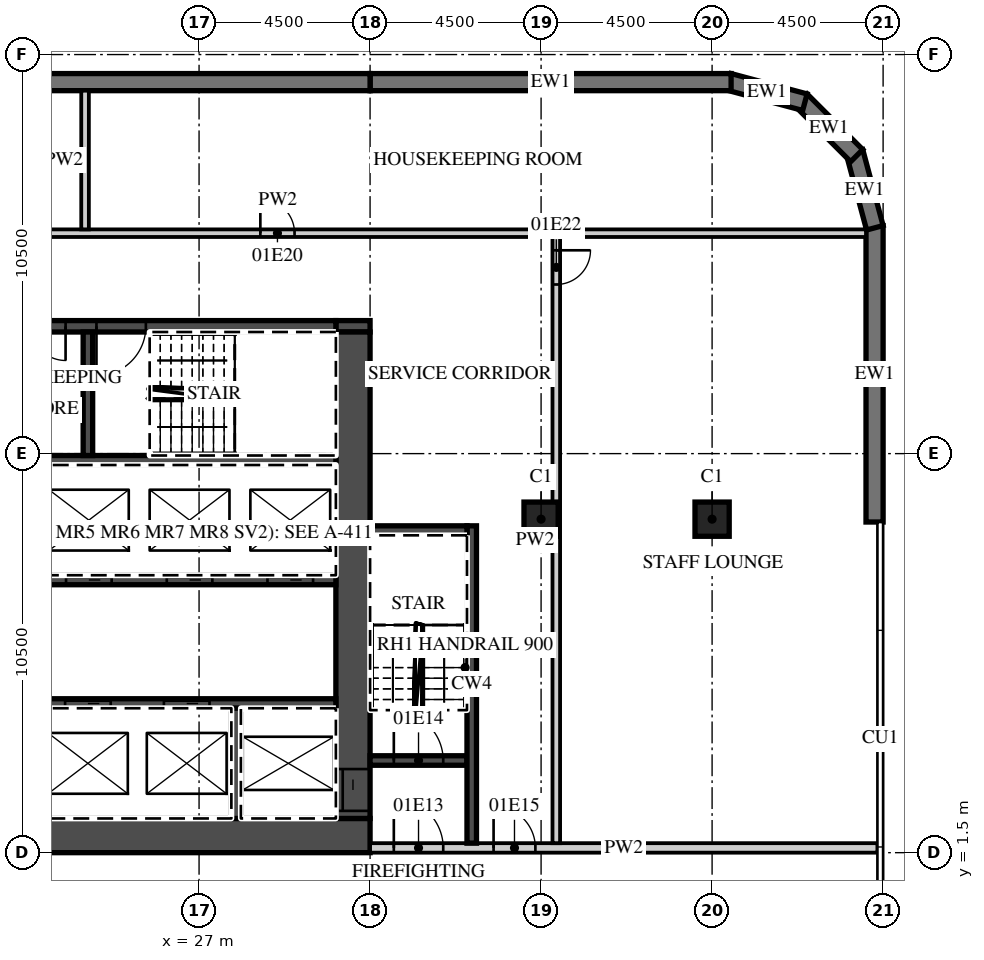
"""IFC4 building model, lengths in metres.
Left out: names, types, materials, properties, quantities, classifications, styles, units other than length and angle.
Written with IfcOpenShell. Run it as: python <this file> out.ifc"""

import sys

from ifc_helpers import new_model, si_unit, direction, frame, frame_2d, origin, origin_2d, place, context, subcontext, project, spatial, polyline, rectangle, outline, extrude, element, fill, save


model = new_model("IFC4")
c1 = context("Model", 3, precision=1e-05, world=origin(), true_north=direction((0.0, 1.0)))
c2 = subcontext(c1, "Body", "Model", "MODEL_VIEW")
j1 = project(units=[si_unit("LENGTHUNIT", "METRE"), si_unit("PLANEANGLEUNIT", "RADIAN")], contexts=[c1])
p1 = place(None, origin())
s1 = spatial("IfcSite", under=j1, at=p1, CompositionType="ELEMENT")
p2 = place(p1, origin())
s2 = spatial("IfcBuilding", under=s1, at=p2, CompositionType="ELEMENT")
p3 = place(p2, frame((0.0, 0.0, 11.0)))
s3 = spatial("IfcBuildingStorey", under=s2, at=p3, CompositionType="ELEMENT", Elevation=11.0)
for number, where, z_axis, x_axis in (
    (1, (36.0, 10.275, 0.0), (0.0, 0.0, 1.0), (1.0, 0.0, 0.0)),
    (2, (40.5, 10.275, 0.0), (0.0, 0.0, 1.0), (1.0, 0.0, 0.0)),
):
    element("IfcColumn", number, at=place(p3, frame(where, z_axis=z_axis, x_axis=x_axis)), inside=s3, PredefinedType="COLUMN", context=c2, shape_type="SweptSolid", body=[
        extrude(rectangle(XDim=0.9, YDim=0.9, at=origin_2d()), origin(), (0.0, 0.0, 1.0), 6.0),
    ])
p4 = place(p3, frame((44.775, 10.2, 0.0), z_axis=(0.0, 0.0, 1.0), x_axis=(0.0, 1.0, 0.0)))
e3 = element("IfcWall", 3, at=p4, inside=s3, PredefinedType="SOLIDWALL", context=c2, shape_type="SweptSolid", body=[
    extrude(rectangle(XDim=7.8, YDim=0.45, at=frame_2d((3.9, 0.0))), origin(), (0.0, 0.0, 1.0), 5.55),
])
p5 = place(p3, frame((44.783, 17.942, 0.0), z_axis=(0.0, 0.0, 1.0), x_axis=(-0.25881466832, 0.965926999034, 0.0)))
e4 = element("IfcWall", 4, at=p5, inside=s3, PredefinedType="SOLIDWALL", context=c2, shape_type="SweptSolid", body=[
    extrude(outline(polyline([(0.0, -0.225), (2.071, -0.225), (1.95, 0.225), (0.121, 0.225), (0.0, -0.225)])), origin(), (0.0, 0.0, 1.0), 5.55),
])
p6 = place(p3, frame((44.305, 19.841, 0.0), z_axis=(0.0, 0.0, 1.0), x_axis=(-0.707106781187, 0.707106781187, 0.0)))
e5 = element("IfcWall", 5, at=p6, inside=s3, PredefinedType="SOLIDWALL", context=c2, shape_type="SweptSolid", body=[
    extrude(outline(polyline([(0.0, -0.225), (2.071, -0.225), (1.95, 0.225), (0.121, 0.225), (0.0, -0.225)])), origin(), (0.0, 0.0, 1.0), 5.55),
])
p7 = place(p3, frame((42.942, 21.247, 0.0), z_axis=(0.0, 0.0, 1.0), x_axis=(-0.965926999034, 0.25881466832, 0.0)))
e6 = element("IfcWall", 6, at=p7, inside=s3, PredefinedType="SOLIDWALL", context=c2, shape_type="SweptSolid", body=[
    extrude(outline(polyline([(-0.0, -0.225), (2.07, -0.225), (1.95, 0.225), (0.12, 0.225), (-0.0, -0.225)])), origin(), (0.0, 0.0, 1.0), 5.55),
])
p8 = place(p3, frame((41.0, 21.775, 0.0), z_axis=(0.0, 0.0, 1.0), x_axis=(-1.0, 0.0, 0.0)))
e7 = element("IfcWall", 7, at=p8, inside=s3, PredefinedType="SOLIDWALL", context=c2, shape_type="SweptSolid", body=[
    extrude(rectangle(XDim=9.5, YDim=0.45, at=frame_2d((4.75, 0.0))), origin(), (0.0, 0.0, 1.0), 5.55),
])
p9 = place(p3, frame((31.5, 21.775, 0.0), z_axis=(0.0, 0.0, 1.0), x_axis=(-1.0, 0.0, 0.0)))
e8 = element("IfcWall", 8, at=p9, inside=s3, PredefinedType="SOLIDWALL", context=c2, shape_type="SweptSolid", body=[
    extrude(rectangle(XDim=18.0, YDim=0.45, at=frame_2d((9.0, 0.0))), origin(), (0.0, 0.0, 1.0), 5.55),
])
p10 = place(p3, frame((13.5, 1.95, 0.0), z_axis=(0.0, 0.0, 1.0), x_axis=(1.0, 0.0, 0.0)))
e9 = element("IfcWall", 9, at=p10, inside=s3, PredefinedType="SHEAR", context=c2, shape_type="SweptSolid", body=[
    extrude(rectangle(XDim=18.0, YDim=0.9, at=frame_2d((9.0, 0.0))), origin(), (0.0, 0.0, 1.0), 5.55),
])
p11 = place(p10, frame((1.475, 0.0, 0.0)))
e10 = element("IfcOpeningElement", 10, at=p11, cuts=e9, PredefinedType="OPENING", context=c2, shape_type="SweptSolid", body=[
    extrude(rectangle(XDim=1.8, YDim=2.1, at=frame_2d((0.9, 1.05))), frame((0.0, 0.46, 0.0), z_axis=(0.0, -1.0, 0.0), x_axis=(1.0, 0.0, 0.0)), (0.0, 0.0, 1.0), 0.92),
])
p12 = place(p3, frame((30.6, 15.35, 0.0), z_axis=(0.0, 0.0, 1.0), x_axis=(1.0, 0.0, 0.0)))
e11 = element("IfcWall", 11, at=p12, inside=s3, PredefinedType="SHEAR", context=c2, shape_type="SweptSolid", body=[
    extrude(rectangle(XDim=0.9, YDim=0.3, at=frame_2d((0.45, 0.0))), origin(), (0.0, 0.0, 1.0), 5.55),
])
p13 = place(p3, frame((20.3, 15.35, 0.0), z_axis=(0.0, 0.0, 1.0), x_axis=(1.0, 0.0, 0.0)))
e12 = element("IfcWall", 12, at=p13, inside=s3, PredefinedType="SHEAR", context=c2, shape_type="SweptSolid", body=[
    extrude(rectangle(XDim=10.3, YDim=0.3, at=frame_2d((5.15, 0.0))), origin(), (0.0, 0.0, 1.0), 5.55),
])
p14 = place(p13, frame((4.0, 0.0, 0.0)))
e13 = element("IfcOpeningElement", 13, at=p14, cuts=e12, PredefinedType="OPENING", context=c2, shape_type="SweptSolid", body=[
    extrude(rectangle(XDim=1.3, YDim=2.1, at=frame_2d((0.65, 1.05))), frame((0.0, 0.16, 0.0), z_axis=(0.0, -1.0, 0.0), x_axis=(1.0, 0.0, 0.0)), (0.0, 0.0, 1.0), 0.32),
])
p15 = place(p13, frame((2.288, 0.0, 0.0)))
e14 = element("IfcOpeningElement", 14, at=p15, cuts=e12, PredefinedType="OPENING", context=c2, shape_type="SweptSolid", body=[
    extrude(rectangle(XDim=0.9, YDim=2.1, at=frame_2d((0.45, 1.05))), frame((0.0, 0.16, 0.0), z_axis=(0.0, -1.0, 0.0), x_axis=(1.0, 0.0, 0.0)), (0.0, 0.0, 1.0), 0.32),
])
p16 = place(p13, frame((0.462, 0.0, 0.0)))
e15 = element("IfcOpeningElement", 15, at=p16, cuts=e12, PredefinedType="OPENING", context=c2, shape_type="SweptSolid", body=[
    extrude(rectangle(XDim=0.9, YDim=2.1, at=frame_2d((0.45, 1.05))), frame((0.0, 0.16, 0.0), z_axis=(0.0, -1.0, 0.0), x_axis=(1.0, 0.0, 0.0)), (0.0, 0.0, 1.0), 0.32),
])
p17 = place(p3, frame((31.05, 2.4, 0.0), z_axis=(0.0, 0.0, 1.0), x_axis=(0.0, 1.0, 0.0)))
e16 = element("IfcWall", 16, at=p17, inside=s3, PredefinedType="SHEAR", context=c2, shape_type="SweptSolid", body=[
    extrude(rectangle(XDim=12.8, YDim=0.9, at=frame_2d((6.4, 0.0))), origin(), (0.0, 0.0, 1.0), 5.55),
])
p18 = place(p17, frame((0.2, 0.0, 0.0)))
e17 = element("IfcOpeningElement", 17, at=p18, cuts=e16, PredefinedType="OPENING", context=c2, shape_type="SweptSolid", body=[
    extrude(rectangle(XDim=1.1, YDim=2.1, at=frame_2d((0.55, 1.05))), frame((0.0, 0.46, 0.0), z_axis=(0.0, -1.0, 0.0), x_axis=(1.0, 0.0, 0.0)), (0.0, 0.0, 1.0), 0.92),
])
p19 = place(p3, frame((17.6, 5.425, 0.0), z_axis=(0.0, 0.0, 1.0), x_axis=(1.0, 0.0, 0.0)))
e18 = element("IfcWall", 18, at=p19, inside=s3, PredefinedType="SHEAR", context=c2, shape_type="SweptSolid", body=[
    extrude(rectangle(XDim=13.0, YDim=0.25, at=frame_2d((6.5, 0.0))), origin(), (0.0, 0.0, 1.0), 5.55),
])
p20 = place(p19, frame((8.475, 0.0, 0.0)))
e19 = element("IfcOpeningElement", 19, at=p20, cuts=e18, PredefinedType="OPENING", context=c2, shape_type="SweptSolid", body=[
    extrude(rectangle(XDim=1.2, YDim=2.1, at=frame_2d((0.6, 1.05))), frame((0.0, 0.135, 0.0), z_axis=(0.0, -1.0, 0.0), x_axis=(1.0, 0.0, 0.0)), (0.0, 0.0, 1.0), 0.27),
])
p21 = place(p19, frame((5.875, 0.0, 0.0)))
e20 = element("IfcOpeningElement", 20, at=p21, cuts=e18, PredefinedType="OPENING", context=c2, shape_type="SweptSolid", body=[
    extrude(rectangle(XDim=1.2, YDim=2.1, at=frame_2d((0.6, 1.05))), frame((0.0, 0.135, 0.0), z_axis=(0.0, -1.0, 0.0), x_axis=(1.0, 0.0, 0.0)), (0.0, 0.0, 1.0), 0.27),
])
p22 = place(p19, frame((3.275, 0.0, 0.0)))
e21 = element("IfcOpeningElement", 21, at=p22, cuts=e18, PredefinedType="OPENING", context=c2, shape_type="SweptSolid", body=[
    extrude(rectangle(XDim=1.2, YDim=2.1, at=frame_2d((0.6, 1.05))), frame((0.0, 0.135, 0.0), z_axis=(0.0, -1.0, 0.0), x_axis=(1.0, 0.0, 0.0)), (0.0, 0.0, 1.0), 0.27),
])
p23 = place(p19, frame((0.625, 0.0, 0.0)))
e22 = element("IfcOpeningElement", 22, at=p23, cuts=e18, PredefinedType="OPENING", context=c2, shape_type="SweptSolid", body=[
    extrude(rectangle(XDim=1.2, YDim=2.1, at=frame_2d((0.6, 1.05))), frame((0.0, 0.135, 0.0), z_axis=(0.0, -1.0, 0.0), x_axis=(1.0, 0.0, 0.0)), (0.0, 0.0, 1.0), 0.27),
])
p24 = place(p3, frame((27.975, 2.4, 0.0), z_axis=(0.0, 0.0, 1.0), x_axis=(0.0, 1.0, 0.0)))
e23 = element("IfcWall", 23, at=p24, inside=s3, PredefinedType="SHEAR", context=c2, shape_type="SweptSolid", body=[
    extrude(rectangle(XDim=2.9, YDim=0.25, at=frame_2d((1.45, 0.0))), origin(), (0.0, 0.0, 1.0), 5.55),
])
p25 = place(p3, frame((14.4, 8.675, 0.0), z_axis=(0.0, 0.0, 1.0), x_axis=(1.0, 0.0, 0.0)))
e24 = element("IfcWall", 24, at=p25, inside=s3, PredefinedType="SHEAR", context=c2, shape_type="SweptSolid", body=[
    extrude(rectangle(XDim=16.2, YDim=0.25, at=frame_2d((8.1, 0.0))), origin(), (0.0, 0.0, 1.0), 5.55),
])
p26 = place(p25, frame((14.4, 0.0, 0.0)))
e25 = element("IfcOpeningElement", 25, at=p26, cuts=e24, PredefinedType="OPENING", context=c2, shape_type="SweptSolid", body=[
    extrude(rectangle(XDim=1.2, YDim=2.1, at=frame_2d((0.6, 1.05))), frame((0.0, 0.135, 0.0), z_axis=(0.0, -1.0, 0.0), x_axis=(1.0, 0.0, 0.0)), (0.0, 0.0, 1.0), 0.27),
])
p27 = place(p25, frame((11.75, 0.0, 0.0)))
e26 = element("IfcOpeningElement", 26, at=p27, cuts=e24, PredefinedType="OPENING", context=c2, shape_type="SweptSolid", body=[
    extrude(rectangle(XDim=1.2, YDim=2.1, at=frame_2d((0.6, 1.05))), frame((0.0, 0.135, 0.0), z_axis=(0.0, -1.0, 0.0), x_axis=(1.0, 0.0, 0.0)), (0.0, 0.0, 1.0), 0.27),
])
p28 = place(p25, frame((9.1, 0.0, 0.0)))
e27 = element("IfcOpeningElement", 27, at=p28, cuts=e24, PredefinedType="OPENING", context=c2, shape_type="SweptSolid", body=[
    extrude(rectangle(XDim=1.2, YDim=2.1, at=frame_2d((0.6, 1.05))), frame((0.0, 0.135, 0.0), z_axis=(0.0, -1.0, 0.0), x_axis=(1.0, 0.0, 0.0)), (0.0, 0.0, 1.0), 0.27),
])
p29 = place(p25, frame((6.45, 0.0, 0.0)))
e28 = element("IfcOpeningElement", 28, at=p29, cuts=e24, PredefinedType="OPENING", context=c2, shape_type="SweptSolid", body=[
    extrude(rectangle(XDim=1.2, YDim=2.1, at=frame_2d((0.6, 1.05))), frame((0.0, 0.135, 0.0), z_axis=(0.0, -1.0, 0.0), x_axis=(1.0, 0.0, 0.0)), (0.0, 0.0, 1.0), 0.27),
])
p30 = place(p25, frame((3.8, 0.0, 0.0)))
e29 = element("IfcOpeningElement", 29, at=p30, cuts=e24, PredefinedType="OPENING", context=c2, shape_type="SweptSolid", body=[
    extrude(rectangle(XDim=1.2, YDim=2.1, at=frame_2d((0.6, 1.05))), frame((0.0, 0.135, 0.0), z_axis=(0.0, -1.0, 0.0), x_axis=(1.0, 0.0, 0.0)), (0.0, 0.0, 1.0), 0.27),
])
p31 = place(p25, frame((0.65, 0.0, 0.0)))
e30 = element("IfcOpeningElement", 30, at=p31, cuts=e24, PredefinedType="OPENING", context=c2, shape_type="SweptSolid", body=[
    extrude(rectangle(XDim=1.3, YDim=2.1, at=frame_2d((0.65, 1.05))), frame((0.0, 0.135, 0.0), z_axis=(0.0, -1.0, 0.0), x_axis=(1.0, 0.0, 0.0)), (0.0, 0.0, 1.0), 0.27),
])
p32 = place(p3, frame((17.35, 11.825, 0.0), z_axis=(0.0, 0.0, 1.0), x_axis=(1.0, 0.0, 0.0)))
e31 = element("IfcWall", 31, at=p32, inside=s3, PredefinedType="SHEAR", context=c2, shape_type="SweptSolid", body=[
    extrude(rectangle(XDim=13.25, YDim=0.25, at=frame_2d((6.625, 0.0))), origin(), (0.0, 0.0, 1.0), 5.55),
])
p33 = place(p3, frame((24.075, 11.95, 0.0), z_axis=(0.0, 0.0, 1.0), x_axis=(0.0, 1.0, 0.0)))
e32 = element("IfcWall", 32, at=p33, inside=s3, PredefinedType="SHEAR", context=c2, shape_type="SweptSolid", body=[
    extrude(rectangle(XDim=3.25, YDim=0.25, at=frame_2d((1.625, 0.0))), origin(), (0.0, 0.0, 1.0), 5.55),
])
p34 = place(p3, frame((31.5, 1.625, 0.0), z_axis=(0.0, 0.0, 1.0), x_axis=(1.0, 0.0, 0.0)))
e33 = element("IfcWall", 33, at=p34, inside=s3, PredefinedType="PARTITIONING", context=c2, shape_type="SweptSolid", body=[
    extrude(rectangle(XDim=13.35, YDim=0.25, at=frame_2d((6.675, 0.0))), origin(), (0.0, 0.0, 1.0), 5.55),
])
p35 = place(p34, frame((0.625, 0.0, 0.0)))
e34 = element("IfcOpeningElement", 34, at=p35, cuts=e33, PredefinedType="OPENING", context=c2, shape_type="SweptSolid", body=[
    extrude(rectangle(XDim=1.3, YDim=2.1, at=frame_2d((0.65, 1.05))), frame((0.0, 0.135, 0.0), z_axis=(0.0, -1.0, 0.0), x_axis=(1.0, 0.0, 0.0)), (0.0, 0.0, 1.0), 0.27),
])
p36 = place(p34, frame((3.25, 0.0, 0.0)))
e35 = element("IfcOpeningElement", 35, at=p36, cuts=e33, PredefinedType="OPENING", context=c2, shape_type="SweptSolid", body=[
    extrude(rectangle(XDim=1.1, YDim=2.1, at=frame_2d((0.55, 1.05))), frame((0.0, 0.135, 0.0), z_axis=(0.0, -1.0, 0.0), x_axis=(1.0, 0.0, 0.0)), (0.0, 0.0, 1.0), 0.27),
])
p37 = place(p3, frame((31.5, 3.925, 0.0), z_axis=(0.0, 0.0, 1.0), x_axis=(1.0, 0.0, 0.0)))
e36 = element("IfcWall", 36, at=p37, inside=s3, PredefinedType="SHEAR", context=c2, shape_type="SweptSolid", body=[
    extrude(rectangle(XDim=2.55, YDim=0.25, at=frame_2d((1.275, 0.0))), origin(), (0.0, 0.0, 1.0), 5.55),
])
p38 = place(p37, frame((0.625, 0.0, 0.0)))
e37 = element("IfcOpeningElement", 37, at=p38, cuts=e36, PredefinedType="OPENING", context=c2, shape_type="SweptSolid", body=[
    extrude(rectangle(XDim=1.3, YDim=2.1, at=frame_2d((0.65, 1.05))), frame((0.0, 0.135, 0.0), z_axis=(0.0, -1.0, 0.0), x_axis=(1.0, 0.0, 0.0)), (0.0, 0.0, 1.0), 0.27),
])
p39 = place(p3, frame((34.175, 1.75, 0.0), z_axis=(0.0, 0.0, 1.0), x_axis=(0.0, 1.0, 0.0)))
e38 = element("IfcWall", 38, at=p39, inside=s3, PredefinedType="SHEAR", context=c2, shape_type="SweptSolid", body=[
    extrude(rectangle(XDim=8.35, YDim=0.25, at=frame_2d((4.175, 0.0))), origin(), (0.0, 0.0, 1.0), 5.55),
])
p40 = place(p3, frame((31.5, 9.975, 0.0), z_axis=(0.0, 0.0, 1.0), x_axis=(1.0, 0.0, 0.0)))
e39 = element("IfcWall", 39, at=p40, inside=s3, PredefinedType="SHEAR", context=c2, shape_type="SweptSolid", body=[
    extrude(rectangle(XDim=2.55, YDim=0.25, at=frame_2d((1.275, 0.0))), origin(), (0.0, 0.0, 1.0), 5.55),
])
p41 = place(p3, frame((36.4, 1.75, 0.0), z_axis=(0.0, 0.0, 1.0), x_axis=(0.0, 1.0, 0.0)))
e40 = element("IfcWall", 40, at=p41, inside=s3, PredefinedType="PARTITIONING", context=c2, shape_type="SweptSolid", body=[
    extrude(rectangle(XDim=15.95, YDim=0.2, at=frame_2d((7.975, 0.0))), origin(), (0.0, 0.0, 1.0), 5.55),
])
p42 = place(p41, frame((14.7, 0.0, 0.0)))
e41 = element("IfcOpeningElement", 41, at=p42, cuts=e40, PredefinedType="OPENING", context=c2, shape_type="SweptSolid", body=[
    extrude(rectangle(XDim=0.9, YDim=2.1, at=frame_2d((0.45, 1.05))), frame((0.0, 0.11, 0.0), z_axis=(0.0, -1.0, 0.0), x_axis=(1.0, 0.0, 0.0)), (0.0, 0.0, 1.0), 0.22),
])
p43 = place(p3, frame((13.6, 17.8, 0.0), z_axis=(0.0, 0.0, 1.0), x_axis=(1.0, 0.0, 0.0)))
e42 = element("IfcWall", 42, at=p43, inside=s3, PredefinedType="PARTITIONING", context=c2, shape_type="SweptSolid", body=[
    extrude(rectangle(XDim=30.95, YDim=0.2, at=frame_2d((15.475, 0.0))), origin(), (0.0, 0.0, 1.0), 5.55),
])
p44 = place(p43, frame((15.012, 0.0, 0.0)))
e43 = element("IfcOpeningElement", 43, at=p44, cuts=e42, PredefinedType="OPENING", context=c2, shape_type="SweptSolid", body=[
    extrude(rectangle(XDim=0.9, YDim=2.1, at=frame_2d((0.45, 1.05))), frame((0.0, 0.11, 0.0), z_axis=(0.0, -1.0, 0.0), x_axis=(1.0, 0.0, 0.0)), (0.0, 0.0, 1.0), 0.22),
])
p45 = place(p43, frame((6.712, 0.0, 0.0)))
e44 = element("IfcOpeningElement", 44, at=p45, cuts=e42, PredefinedType="OPENING", context=c2, shape_type="SweptSolid", body=[
    extrude(rectangle(XDim=0.9, YDim=2.1, at=frame_2d((0.45, 1.05))), frame((0.0, 0.11, 0.0), z_axis=(0.0, -1.0, 0.0), x_axis=(1.0, 0.0, 0.0)), (0.0, 0.0, 1.0), 0.22),
])
p46 = place(p3, frame((24.0, 17.9, 0.0), z_axis=(0.0, 0.0, 1.0), x_axis=(0.0, 1.0, 0.0)))
e45 = element("IfcWall", 45, at=p46, inside=s3, PredefinedType="PARTITIONING", context=c2, shape_type="SweptSolid", body=[
    extrude(rectangle(XDim=3.65, YDim=0.2, at=frame_2d((1.825, 0.0))), origin(), (0.0, 0.0, 1.0), 5.55),
])
p47 = place(p26, origin())
e46 = element("IfcDoor", 46, at=p47, inside=s3, OperationType="SLIDING_TO_LEFT", PredefinedType="DOOR", context=c2, shape_type="SweptSolid", body=[
    extrude(rectangle(XDim=1.2, YDim=2.1, at=frame_2d((0.6, 1.05))), frame((0.0, 0.025, 0.0), z_axis=(0.0, -1.0, 0.0), x_axis=(1.0, 0.0, 0.0)), (0.0, 0.0, 1.0), 0.05),
])
fill(e25, e46)
p48 = place(p27, origin())
e47 = element("IfcDoor", 47, at=p48, inside=s3, OperationType="SLIDING_TO_RIGHT", PredefinedType="DOOR", context=c2, shape_type="SweptSolid", body=[
    extrude(rectangle(XDim=1.2, YDim=2.1, at=frame_2d((0.6, 1.05))), frame((0.0, 0.025, 0.0), z_axis=(0.0, -1.0, 0.0), x_axis=(1.0, 0.0, 0.0)), (0.0, 0.0, 1.0), 0.05),
])
fill(e26, e47)
p49 = place(p28, origin())
e48 = element("IfcDoor", 48, at=p49, inside=s3, OperationType="SLIDING_TO_RIGHT", PredefinedType="DOOR", context=c2, shape_type="SweptSolid", body=[
    extrude(rectangle(XDim=1.2, YDim=2.1, at=frame_2d((0.6, 1.05))), frame((0.0, 0.025, 0.0), z_axis=(0.0, -1.0, 0.0), x_axis=(1.0, 0.0, 0.0)), (0.0, 0.0, 1.0), 0.05),
])
fill(e27, e48)
p50 = place(p20, origin())
e49 = element("IfcDoor", 49, at=p50, inside=s3, OperationType="SLIDING_TO_LEFT", PredefinedType="DOOR", context=c2, shape_type="SweptSolid", body=[
    extrude(rectangle(XDim=1.2, YDim=2.1, at=frame_2d((0.6, 1.05))), frame((0.0, 0.025, 0.0), z_axis=(0.0, -1.0, 0.0), x_axis=(1.0, 0.0, 0.0)), (0.0, 0.0, 1.0), 0.05),
])
fill(e19, e49)
p51 = place(p21, origin())
e50 = element("IfcDoor", 50, at=p51, inside=s3, OperationType="SLIDING_TO_RIGHT", PredefinedType="DOOR", context=c2, shape_type="SweptSolid", body=[
    extrude(rectangle(XDim=1.2, YDim=2.1, at=frame_2d((0.6, 1.05))), frame((0.0, 0.025, 0.0), z_axis=(0.0, -1.0, 0.0), x_axis=(1.0, 0.0, 0.0)), (0.0, 0.0, 1.0), 0.05),
])
fill(e20, e50)
p52 = place(p18, origin())
e51 = element("IfcDoor", 51, at=p52, inside=s3, OperationType="SLIDING_TO_LEFT", PredefinedType="DOOR", context=c2, shape_type="SweptSolid", body=[
    extrude(rectangle(XDim=1.1, YDim=2.1, at=frame_2d((0.55, 1.05))), frame((0.0, 0.025, 0.0), z_axis=(0.0, -1.0, 0.0), x_axis=(1.0, 0.0, 0.0)), (0.0, 0.0, 1.0), 0.05),
])
fill(e17, e51)
p53 = place(p35, origin())
e52 = element("IfcDoor", 52, at=p53, inside=s3, OperationType="SINGLE_SWING_LEFT", PredefinedType="DOOR", context=c2, shape_type="SweptSolid", body=[
    extrude(rectangle(XDim=1.3, YDim=2.1, at=frame_2d((0.65, 1.05))), frame((0.0, 0.025, 0.0), z_axis=(0.0, -1.0, 0.0), x_axis=(1.0, 0.0, 0.0)), (0.0, 0.0, 1.0), 0.05),
])
fill(e34, e52)
p54 = place(p38, origin())
e53 = element("IfcDoor", 53, at=p54, inside=s3, OperationType="SINGLE_SWING_LEFT", PredefinedType="DOOR", context=c2, shape_type="SweptSolid", body=[
    extrude(rectangle(XDim=1.3, YDim=2.1, at=frame_2d((0.65, 1.05))), frame((0.0, 0.025, 0.0), z_axis=(0.0, -1.0, 0.0), x_axis=(1.0, 0.0, 0.0)), (0.0, 0.0, 1.0), 0.05),
])
fill(e37, e53)
p55 = place(p36, origin())
e54 = element("IfcDoor", 54, at=p55, inside=s3, OperationType="SINGLE_SWING_LEFT", PredefinedType="DOOR", context=c2, shape_type="SweptSolid", body=[
    extrude(rectangle(XDim=1.1, YDim=2.1, at=frame_2d((0.55, 1.05))), frame((0.0, 0.025, 0.0), z_axis=(0.0, -1.0, 0.0), x_axis=(1.0, 0.0, 0.0)), (0.0, 0.0, 1.0), 0.05),
])
fill(e35, e54)
p56 = place(p14, origin())
e55 = element("IfcDoor", 55, at=p56, inside=s3, OperationType="SINGLE_SWING_LEFT", PredefinedType="DOOR", context=c2, shape_type="SweptSolid", body=[
    extrude(rectangle(XDim=1.3, YDim=2.1, at=frame_2d((0.65, 1.05))), frame((0.0, 0.025, 0.0), z_axis=(0.0, -1.0, 0.0), x_axis=(1.0, 0.0, 0.0)), (0.0, 0.0, 1.0), 0.05),
])
fill(e13, e55)
p57 = place(p15, origin())
e56 = element("IfcDoor", 56, at=p57, inside=s3, OperationType="SINGLE_SWING_RIGHT", PredefinedType="DOOR", context=c2, shape_type="SweptSolid", body=[
    extrude(rectangle(XDim=0.9, YDim=2.1, at=frame_2d((0.45, 1.05))), frame((0.0, 0.025, 0.0), z_axis=(0.0, -1.0, 0.0), x_axis=(1.0, 0.0, 0.0)), (0.0, 0.0, 1.0), 0.05),
])
fill(e14, e56)
p58 = place(p44, origin())
e57 = element("IfcDoor", 57, at=p58, inside=s3, OperationType="SINGLE_SWING_LEFT", PredefinedType="DOOR", context=c2, shape_type="SweptSolid", body=[
    extrude(rectangle(XDim=0.9, YDim=2.1, at=frame_2d((0.45, 1.05))), frame((0.0, 0.025, 0.0), z_axis=(0.0, -1.0, 0.0), x_axis=(1.0, 0.0, 0.0)), (0.0, 0.0, 1.0), 0.05),
])
fill(e43, e57)
p59 = place(p42, origin())
e58 = element("IfcDoor", 58, at=p59, inside=s3, OperationType="SINGLE_SWING_RIGHT", PredefinedType="DOOR", context=c2, shape_type="SweptSolid", body=[
    extrude(rectangle(XDim=0.9, YDim=2.1, at=frame_2d((0.45, 1.05))), frame((0.0, 0.025, 0.0), z_axis=(0.0, -1.0, 0.0), x_axis=(1.0, 0.0, 0.0)), (0.0, 0.0, 1.0), 0.05),
])
fill(e41, e58)
save(model, sys.argv[1])
